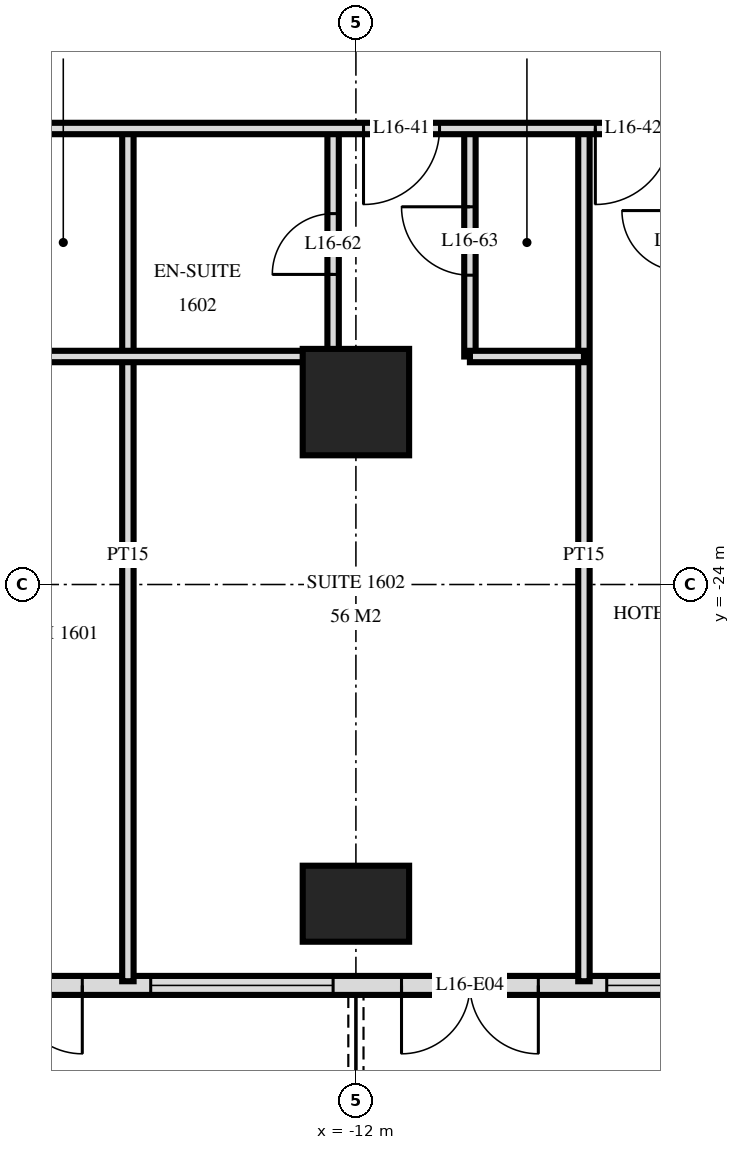
"""IFC4 building model, lengths in metres.
Left out: names, types, materials, properties, quantities, classifications, styles, units other than length and angle.
Written with IfcOpenShell. Run it as: python <this file> out.ifc"""

import sys

from ifc_helpers import new_model, si_unit, direction, frame, frame_2d, origin, origin_2d, place, context, subcontext, project, spatial, rectangle, extrude, element, fill, save


model = new_model("IFC4")
c1 = context("Model", 3, precision=1e-05, world=origin(), true_north=direction((0.0, 1.0)))
c2 = subcontext(c1, "Body", "Model", "MODEL_VIEW")
j1 = project(units=[si_unit("LENGTHUNIT", "METRE"), si_unit("PLANEANGLEUNIT", "RADIAN")], contexts=[c1])
p1 = place(None, origin())
s1 = spatial("IfcSite", under=j1, at=p1, CompositionType="ELEMENT")
p2 = place(p1, origin())
s2 = spatial("IfcBuilding", under=s1, at=p2, CompositionType="ELEMENT")
p3 = place(p2, frame((0.0, 0.0, 67.2)))
s3 = spatial("IfcBuildingStorey", under=s2, at=p3, CompositionType="ELEMENT", Elevation=67.2)
p4 = place(p3, frame((-12.0, -28.2, 0.0), z_axis=(0.0, 0.0, 1.0), x_axis=(1.0, 0.0, 0.0)))
e1 = element("IfcColumn", 1, at=p4, inside=s3, PredefinedType="COLUMN", context=c2, shape_type="SweptSolid", body=[
    extrude(rectangle(XDim=1.4, YDim=1.0, at=origin_2d()), origin(), (0.0, 0.0, 1.0), 3.6),
])
p5 = place(p3, frame((-12.0, -21.6, 0.0), z_axis=(0.0, 0.0, 1.0), x_axis=(1.0, 0.0, 0.0)))
e2 = element("IfcColumn", 2, at=p5, inside=s3, PredefinedType="COLUMN", context=c2, shape_type="SweptSolid", body=[
    extrude(rectangle(XDim=1.4, YDim=1.4, at=origin_2d()), origin(), (0.0, 0.0, 1.0), 3.6),
])
p6 = place(p3, frame((-28.775, -29.275, 0.0), z_axis=(0.0, 0.0, 1.0), x_axis=(1.0, 0.0, 0.0)))
e3 = element("IfcWall", 3, at=p6, inside=s3, PredefinedType="SOLIDWALL", context=c2, shape_type="SweptSolid", body=[
    extrude(rectangle(XDim=57.551, YDim=0.25, at=frame_2d((28.775, 0.0))), origin(), (0.0, 0.0, 1.0), 3.32),
])
p7 = place(p6, frame((0.575, 0.0, 0.0)))
e4 = element("IfcOpeningElement", 4, at=p7, cuts=e3, PredefinedType="OPENING", context=c2, shape_type="SweptSolid", body=[
    extrude(rectangle(XDim=1.8, YDim=2.4, at=frame_2d((0.9, 1.2))), frame((0.0, 0.135, 0.0), z_axis=(0.0, -1.0, 0.0), x_axis=(1.0, 0.0, 0.0)), (0.0, 0.0, 1.0), 0.27),
])
p8 = place(p6, frame((5.075, 0.0, 0.3)))
e5 = element("IfcOpeningElement", 5, at=p8, cuts=e3, PredefinedType="OPENING", context=c2, shape_type="SweptSolid", body=[
    extrude(rectangle(XDim=2.4, YDim=2.1, at=frame_2d((1.2, 1.05))), frame((0.0, 0.135, 0.0), z_axis=(0.0, -1.0, 0.0), x_axis=(1.0, 0.0, 0.0)), (0.0, 0.0, 1.0), 0.27),
])
p9 = place(p6, frame((8.375, 0.0, 0.0)))
e6 = element("IfcOpeningElement", 6, at=p9, cuts=e3, PredefinedType="OPENING", context=c2, shape_type="SweptSolid", body=[
    extrude(rectangle(XDim=1.8, YDim=2.4, at=frame_2d((0.9, 1.2))), frame((0.0, 0.135, 0.0), z_axis=(0.0, -1.0, 0.0), x_axis=(1.0, 0.0, 0.0)), (0.0, 0.0, 1.0), 0.27),
])
p10 = place(p6, frame((11.375, 0.0, 0.0)))
e7 = element("IfcOpeningElement", 7, at=p10, cuts=e3, PredefinedType="OPENING", context=c2, shape_type="SweptSolid", body=[
    extrude(rectangle(XDim=1.8, YDim=2.4, at=frame_2d((0.9, 1.2))), frame((0.0, 0.135, 0.0), z_axis=(0.0, -1.0, 0.0), x_axis=(1.0, 0.0, 0.0)), (0.0, 0.0, 1.0), 0.27),
])
p11 = place(p6, frame((14.075, 0.0, 0.3)))
e8 = element("IfcOpeningElement", 8, at=p11, cuts=e3, PredefinedType="OPENING", context=c2, shape_type="SweptSolid", body=[
    extrude(rectangle(XDim=2.4, YDim=2.1, at=frame_2d((1.2, 1.05))), frame((0.0, 0.135, 0.0), z_axis=(0.0, -1.0, 0.0), x_axis=(1.0, 0.0, 0.0)), (0.0, 0.0, 1.0), 0.27),
])
p12 = place(p6, frame((17.375, 0.0, 0.0)))
e9 = element("IfcOpeningElement", 9, at=p12, cuts=e3, PredefinedType="OPENING", context=c2, shape_type="SweptSolid", body=[
    extrude(rectangle(XDim=1.8, YDim=2.4, at=frame_2d((0.9, 1.2))), frame((0.0, 0.135, 0.0), z_axis=(0.0, -1.0, 0.0), x_axis=(1.0, 0.0, 0.0)), (0.0, 0.0, 1.0), 0.27),
])
p13 = place(p6, frame((20.075, 0.0, 0.3)))
e10 = element("IfcOpeningElement", 10, at=p13, cuts=e3, PredefinedType="OPENING", context=c2, shape_type="SweptSolid", body=[
    extrude(rectangle(XDim=2.4, YDim=2.1, at=frame_2d((1.2, 1.05))), frame((0.0, 0.135, 0.0), z_axis=(0.0, -1.0, 0.0), x_axis=(1.0, 0.0, 0.0)), (0.0, 0.0, 1.0), 0.27),
])
p14 = place(p6, frame((23.075, 0.0, 0.3)))
e11 = element("IfcOpeningElement", 11, at=p14, cuts=e3, PredefinedType="OPENING", context=c2, shape_type="SweptSolid", body=[
    extrude(rectangle(XDim=2.4, YDim=2.1, at=frame_2d((1.2, 1.05))), frame((0.0, 0.135, 0.0), z_axis=(0.0, -1.0, 0.0), x_axis=(1.0, 0.0, 0.0)), (0.0, 0.0, 1.0), 0.27),
])
p15 = place(p6, frame((26.375, 0.0, 0.0)))
e12 = element("IfcOpeningElement", 12, at=p15, cuts=e3, PredefinedType="OPENING", context=c2, shape_type="SweptSolid", body=[
    extrude(rectangle(XDim=1.8, YDim=2.4, at=frame_2d((0.9, 1.2))), frame((0.0, 0.135, 0.0), z_axis=(0.0, -1.0, 0.0), x_axis=(1.0, 0.0, 0.0)), (0.0, 0.0, 1.0), 0.27),
])
p16 = place(p6, frame((29.375, 0.0, 0.0)))
e13 = element("IfcOpeningElement", 13, at=p16, cuts=e3, PredefinedType="OPENING", context=c2, shape_type="SweptSolid", body=[
    extrude(rectangle(XDim=1.8, YDim=2.4, at=frame_2d((0.9, 1.2))), frame((0.0, 0.135, 0.0), z_axis=(0.0, -1.0, 0.0), x_axis=(1.0, 0.0, 0.0)), (0.0, 0.0, 1.0), 0.27),
])
p17 = place(p6, frame((32.075, 0.0, 0.3)))
e14 = element("IfcOpeningElement", 14, at=p17, cuts=e3, PredefinedType="OPENING", context=c2, shape_type="SweptSolid", body=[
    extrude(rectangle(XDim=2.4, YDim=2.1, at=frame_2d((1.2, 1.05))), frame((0.0, 0.135, 0.0), z_axis=(0.0, -1.0, 0.0), x_axis=(1.0, 0.0, 0.0)), (0.0, 0.0, 1.0), 0.27),
])
p18 = place(p6, frame((35.375, 0.0, 0.0)))
e15 = element("IfcOpeningElement", 15, at=p18, cuts=e3, PredefinedType="OPENING", context=c2, shape_type="SweptSolid", body=[
    extrude(rectangle(XDim=1.8, YDim=2.4, at=frame_2d((0.9, 1.2))), frame((0.0, 0.135, 0.0), z_axis=(0.0, -1.0, 0.0), x_axis=(1.0, 0.0, 0.0)), (0.0, 0.0, 1.0), 0.27),
])
p19 = place(p6, frame((38.075, 0.0, 0.3)))
e16 = element("IfcOpeningElement", 16, at=p19, cuts=e3, PredefinedType="OPENING", context=c2, shape_type="SweptSolid", body=[
    extrude(rectangle(XDim=2.4, YDim=2.1, at=frame_2d((1.2, 1.05))), frame((0.0, 0.135, 0.0), z_axis=(0.0, -1.0, 0.0), x_axis=(1.0, 0.0, 0.0)), (0.0, 0.0, 1.0), 0.27),
])
p20 = place(p6, frame((41.075, 0.0, 0.3)))
e17 = element("IfcOpeningElement", 17, at=p20, cuts=e3, PredefinedType="OPENING", context=c2, shape_type="SweptSolid", body=[
    extrude(rectangle(XDim=2.4, YDim=2.1, at=frame_2d((1.2, 1.05))), frame((0.0, 0.135, 0.0), z_axis=(0.0, -1.0, 0.0), x_axis=(1.0, 0.0, 0.0)), (0.0, 0.0, 1.0), 0.27),
])
p21 = place(p6, frame((44.375, 0.0, 0.0)))
e18 = element("IfcOpeningElement", 18, at=p21, cuts=e3, PredefinedType="OPENING", context=c2, shape_type="SweptSolid", body=[
    extrude(rectangle(XDim=1.8, YDim=2.4, at=frame_2d((0.9, 1.2))), frame((0.0, 0.135, 0.0), z_axis=(0.0, -1.0, 0.0), x_axis=(1.0, 0.0, 0.0)), (0.0, 0.0, 1.0), 0.27),
])
p22 = place(p6, frame((47.075, 0.0, 0.3)))
e19 = element("IfcOpeningElement", 19, at=p22, cuts=e3, PredefinedType="OPENING", context=c2, shape_type="SweptSolid", body=[
    extrude(rectangle(XDim=2.4, YDim=2.1, at=frame_2d((1.2, 1.05))), frame((0.0, 0.135, 0.0), z_axis=(0.0, -1.0, 0.0), x_axis=(1.0, 0.0, 0.0)), (0.0, 0.0, 1.0), 0.27),
])
p23 = place(p6, frame((50.375, 0.0, 0.0)))
e20 = element("IfcOpeningElement", 20, at=p23, cuts=e3, PredefinedType="OPENING", context=c2, shape_type="SweptSolid", body=[
    extrude(rectangle(XDim=1.8, YDim=2.4, at=frame_2d((0.9, 1.2))), frame((0.0, 0.135, 0.0), z_axis=(0.0, -1.0, 0.0), x_axis=(1.0, 0.0, 0.0)), (0.0, 0.0, 1.0), 0.27),
])
p24 = place(p6, frame((53.375, 0.0, 0.0)))
e21 = element("IfcOpeningElement", 21, at=p24, cuts=e3, PredefinedType="OPENING", context=c2, shape_type="SweptSolid", body=[
    extrude(rectangle(XDim=1.8, YDim=2.4, at=frame_2d((0.9, 1.2))), frame((0.0, 0.135, 0.0), z_axis=(0.0, -1.0, 0.0), x_axis=(1.0, 0.0, 0.0)), (0.0, 0.0, 1.0), 0.27),
])
p25 = place(p3, frame((-9.0, -29.22, 0.0), z_axis=(0.0, 0.0, 1.0), x_axis=(0.0, 1.0, 0.0)))
e22 = element("IfcWall", 22, at=p25, inside=s3, PredefinedType="PARTITIONING", context=c2, shape_type="SweptSolid", body=[
    extrude(rectangle(XDim=11.22, YDim=0.15, at=frame_2d((5.61, 0.0))), origin(), (0.0, 0.0, 1.0), 3.32),
])
p26 = place(p3, frame((-10.5, -21.0, 0.0), z_axis=(0.0, 0.0, 1.0), x_axis=(0.0, 1.0, 0.0)))
e23 = element("IfcWall", 23, at=p26, inside=s3, PredefinedType="PARTITIONING", context=c2, shape_type="SweptSolid", body=[
    extrude(rectangle(XDim=3.0, YDim=0.15, at=frame_2d((1.5, 0.0))), origin(), (0.0, 0.0, 1.0), 3.32),
])
p27 = place(p26, frame((1.07, 0.0, 0.0)))
e24 = element("IfcOpeningElement", 24, at=p27, cuts=e23, PredefinedType="OPENING", context=c2, shape_type="SweptSolid", body=[
    extrude(rectangle(XDim=0.9, YDim=2.1, at=frame_2d((0.45, 1.05))), frame((0.0, 0.085, 0.0), z_axis=(0.0, -1.0, 0.0), x_axis=(1.0, 0.0, 0.0)), (0.0, 0.0, 1.0), 0.17),
])
p28 = place(p3, frame((-12.3, -21.0, 0.0), z_axis=(0.0, 0.0, 1.0), x_axis=(0.0, 1.0, 0.0)))
e25 = element("IfcWall", 25, at=p28, inside=s3, PredefinedType="PARTITIONING", context=c2, shape_type="SweptSolid", body=[
    extrude(rectangle(XDim=3.0, YDim=0.15, at=frame_2d((1.5, 0.0))), origin(), (0.0, 0.0, 1.0), 3.32),
])
p29 = place(p28, frame((1.08, 0.0, 0.0)))
e26 = element("IfcOpeningElement", 26, at=p29, cuts=e25, PredefinedType="OPENING", context=c2, shape_type="SweptSolid", body=[
    extrude(rectangle(XDim=0.8, YDim=2.1, at=frame_2d((0.4, 1.05))), frame((0.0, 0.085, 0.0), z_axis=(0.0, -1.0, 0.0), x_axis=(1.0, 0.0, 0.0)), (0.0, 0.0, 1.0), 0.17),
])
p30 = place(p3, frame((-15.0, -29.22, 0.0), z_axis=(0.0, 0.0, 1.0), x_axis=(0.0, 1.0, 0.0)))
e27 = element("IfcWall", 27, at=p30, inside=s3, PredefinedType="PARTITIONING", context=c2, shape_type="SweptSolid", body=[
    extrude(rectangle(XDim=11.22, YDim=0.15, at=frame_2d((5.61, 0.0))), origin(), (0.0, 0.0, 1.0), 3.32),
])
p31 = place(p3, frame((-16.7, -21.0, 0.0), z_axis=(0.0, 0.0, 1.0), x_axis=(1.0, 0.0, 0.0)))
e28 = element("IfcWall", 28, at=p31, inside=s3, PredefinedType="PARTITIONING", context=c2, shape_type="SweptSolid", body=[
    extrude(rectangle(XDim=4.4, YDim=0.15, at=frame_2d((2.2, 0.0))), origin(), (0.0, 0.0, 1.0), 3.32),
])
p32 = place(p3, frame((-10.5, -21.0, 0.0), z_axis=(0.0, 0.0, 1.0), x_axis=(1.0, 0.0, 0.0)))
e29 = element("IfcWall", 29, at=p32, inside=s3, PredefinedType="PARTITIONING", context=c2, shape_type="SweptSolid", body=[
    extrude(rectangle(XDim=1.5, YDim=0.15, at=frame_2d((0.75, 0.0))), origin(), (0.0, 0.0, 1.0), 3.32),
])
p33 = place(p3, frame((-33.12, -18.0, 0.0), z_axis=(0.0, 0.0, 1.0), x_axis=(1.0, 0.0, 0.0)))
e30 = element("IfcWall", 30, at=p33, inside=s3, PredefinedType="PARTITIONING", context=c2, shape_type="SweptSolid", body=[
    extrude(rectangle(XDim=66.24, YDim=0.15, at=frame_2d((33.12, 0.0))), origin(), (0.0, 0.0, 1.0), 3.32),
])
p34 = place(p33, frame((15.27, 0.0, 0.0)))
e31 = element("IfcOpeningElement", 31, at=p34, cuts=e30, PredefinedType="OPENING", context=c2, shape_type="SweptSolid", body=[
    extrude(rectangle(XDim=1.0, YDim=2.1, at=frame_2d((0.5, 1.05))), frame((0.0, 0.085, 0.0), z_axis=(0.0, -1.0, 0.0), x_axis=(1.0, 0.0, 0.0)), (0.0, 0.0, 1.0), 0.17),
])
p35 = place(p33, frame((21.22, 0.0, 0.0)))
e32 = element("IfcOpeningElement", 32, at=p35, cuts=e30, PredefinedType="OPENING", context=c2, shape_type="SweptSolid", body=[
    extrude(rectangle(XDim=1.0, YDim=2.1, at=frame_2d((0.5, 1.05))), frame((0.0, 0.085, 0.0), z_axis=(0.0, -1.0, 0.0), x_axis=(1.0, 0.0, 0.0)), (0.0, 0.0, 1.0), 0.17),
])
p36 = place(p33, frame((24.27, 0.0, 0.0)))
e33 = element("IfcOpeningElement", 33, at=p36, cuts=e30, PredefinedType="OPENING", context=c2, shape_type="SweptSolid", body=[
    extrude(rectangle(XDim=1.0, YDim=2.1, at=frame_2d((0.5, 1.05))), frame((0.0, 0.085, 0.0), z_axis=(0.0, -1.0, 0.0), x_axis=(1.0, 0.0, 0.0)), (0.0, 0.0, 1.0), 0.17),
])
p37 = place(p33, frame((30.97, 0.0, 0.0)))
e34 = element("IfcOpeningElement", 34, at=p37, cuts=e30, PredefinedType="OPENING", context=c2, shape_type="SweptSolid", body=[
    extrude(rectangle(XDim=1.0, YDim=2.1, at=frame_2d((0.5, 1.05))), frame((0.0, 0.085, 0.0), z_axis=(0.0, -1.0, 0.0), x_axis=(1.0, 0.0, 0.0)), (0.0, 0.0, 1.0), 0.17),
])
p38 = place(p33, frame((40.42, 0.0, 0.0)))
e35 = element("IfcOpeningElement", 35, at=p38, cuts=e30, PredefinedType="OPENING", context=c2, shape_type="SweptSolid", body=[
    extrude(rectangle(XDim=1.0, YDim=2.1, at=frame_2d((0.5, 1.05))), frame((0.0, 0.085, 0.0), z_axis=(0.0, -1.0, 0.0), x_axis=(1.0, 0.0, 0.0)), (0.0, 0.0, 1.0), 0.17),
])
p39 = place(p33, frame((43.97, 0.0, 0.0)))
e36 = element("IfcOpeningElement", 36, at=p39, cuts=e30, PredefinedType="OPENING", context=c2, shape_type="SweptSolid", body=[
    extrude(rectangle(XDim=1.0, YDim=2.1, at=frame_2d((0.5, 1.05))), frame((0.0, 0.085, 0.0), z_axis=(0.0, -1.0, 0.0), x_axis=(1.0, 0.0, 0.0)), (0.0, 0.0, 1.0), 0.17),
])
p40 = place(p33, frame((45.52, 0.0, 0.0)))
e37 = element("IfcOpeningElement", 37, at=p40, cuts=e30, PredefinedType="OPENING", context=c2, shape_type="SweptSolid", body=[
    extrude(rectangle(XDim=1.0, YDim=2.1, at=frame_2d((0.5, 1.05))), frame((0.0, 0.085, 0.0), z_axis=(0.0, -1.0, 0.0), x_axis=(1.0, 0.0, 0.0)), (0.0, 0.0, 1.0), 0.17),
])
p41 = place(p33, frame((52.97, 0.0, 0.0)))
e38 = element("IfcOpeningElement", 38, at=p41, cuts=e30, PredefinedType="OPENING", context=c2, shape_type="SweptSolid", body=[
    extrude(rectangle(XDim=1.0, YDim=2.1, at=frame_2d((0.5, 1.05))), frame((0.0, 0.085, 0.0), z_axis=(0.0, -1.0, 0.0), x_axis=(1.0, 0.0, 0.0)), (0.0, 0.0, 1.0), 0.17),
])
p42 = place(p33, frame((54.27, 0.0, 0.0)))
e39 = element("IfcOpeningElement", 39, at=p42, cuts=e30, PredefinedType="OPENING", context=c2, shape_type="SweptSolid", body=[
    extrude(rectangle(XDim=1.0, YDim=2.1, at=frame_2d((0.5, 1.05))), frame((0.0, 0.085, 0.0), z_axis=(0.0, -1.0, 0.0), x_axis=(1.0, 0.0, 0.0)), (0.0, 0.0, 1.0), 0.17),
])
p43 = place(p33, frame((13.42, 0.0, 0.0)))
e40 = element("IfcOpeningElement", 40, at=p43, cuts=e30, PredefinedType="OPENING", context=c2, shape_type="SweptSolid", body=[
    extrude(rectangle(XDim=1.0, YDim=2.1, at=frame_2d((0.5, 1.05))), frame((0.0, 0.085, 0.0), z_axis=(0.0, -1.0, 0.0), x_axis=(1.0, 0.0, 0.0)), (0.0, 0.0, 1.0), 0.17),
])
p44 = place(p33, frame((60.82, 0.0, 0.0)))
e41 = element("IfcOpeningElement", 41, at=p44, cuts=e30, PredefinedType="OPENING", context=c2, shape_type="SweptSolid", body=[
    extrude(rectangle(XDim=1.0, YDim=2.1, at=frame_2d((0.5, 1.05))), frame((0.0, 0.085, 0.0), z_axis=(0.0, -1.0, 0.0), x_axis=(1.0, 0.0, 0.0)), (0.0, 0.0, 1.0), 0.17),
])
p45 = place(p10, frame((0.9, 0.0, 0.0), z_axis=(0.0, 0.0, 1.0), x_axis=(-1.0, 0.0, 0.0)))
e42 = element("IfcDoor", 42, at=p45, inside=s3, OperationType="DOUBLE_DOOR_SINGLE_SWING", PredefinedType="DOOR", context=c2, shape_type="SweptSolid", body=[
    extrude(rectangle(XDim=1.8, YDim=2.4, at=frame_2d((0.0, 1.2))), frame((0.0, -0.025, 0.0), z_axis=(0.0, 1.0, 0.0), x_axis=(-1.0, 0.0, 0.0)), (0.0, 0.0, 1.0), 0.05),
])
fill(e7, e42)
p46 = place(p11, origin())
e43 = element("IfcWindow", 43, at=p46, inside=s3, PartitioningType="SINGLE_PANEL", PredefinedType="WINDOW", context=c2, shape_type="SweptSolid", body=[
    extrude(rectangle(XDim=2.4, YDim=2.1, at=frame_2d((1.2, 1.05))), frame((0.0, 0.03, 0.0), z_axis=(0.0, -1.0, 0.0), x_axis=(1.0, 0.0, 0.0)), (0.0, 0.0, 1.0), 0.06),
])
fill(e8, e43)
p47 = place(p12, frame((0.9, 0.0, 0.0), z_axis=(0.0, 0.0, 1.0), x_axis=(-1.0, 0.0, 0.0)))
e44 = element("IfcDoor", 44, at=p47, inside=s3, OperationType="DOUBLE_DOOR_SINGLE_SWING", PredefinedType="DOOR", context=c2, shape_type="SweptSolid", body=[
    extrude(rectangle(XDim=1.8, YDim=2.4, at=frame_2d((0.0, 1.2))), frame((0.0, -0.025, 0.0), z_axis=(0.0, 1.0, 0.0), x_axis=(-1.0, 0.0, 0.0)), (0.0, 0.0, 1.0), 0.05),
])
fill(e9, e44)
p48 = place(p13, origin())
e45 = element("IfcWindow", 45, at=p48, inside=s3, PartitioningType="SINGLE_PANEL", PredefinedType="WINDOW", context=c2, shape_type="SweptSolid", body=[
    extrude(rectangle(XDim=2.4, YDim=2.1, at=frame_2d((1.2, 1.05))), frame((0.0, 0.03, 0.0), z_axis=(0.0, -1.0, 0.0), x_axis=(1.0, 0.0, 0.0)), (0.0, 0.0, 1.0), 0.06),
])
fill(e10, e45)
p49 = place(p35, frame((0.5, 0.0, 0.0), z_axis=(0.0, 0.0, 1.0), x_axis=(-1.0, 0.0, 0.0)))
e46 = element("IfcDoor", 46, at=p49, inside=s3, OperationType="SINGLE_SWING_LEFT", PredefinedType="DOOR", context=c2, shape_type="SweptSolid", body=[
    extrude(rectangle(XDim=1.0, YDim=2.1, at=frame_2d((0.0, 1.05))), frame((0.0, -0.025, 0.0), z_axis=(0.0, 1.0, 0.0), x_axis=(-1.0, 0.0, 0.0)), (0.0, 0.0, 1.0), 0.05),
])
fill(e32, e46)
p50 = place(p36, frame((0.5, 0.0, 0.0), z_axis=(0.0, 0.0, 1.0), x_axis=(-1.0, 0.0, 0.0)))
e47 = element("IfcDoor", 47, at=p50, inside=s3, OperationType="SINGLE_SWING_LEFT", PredefinedType="DOOR", context=c2, shape_type="SweptSolid", body=[
    extrude(rectangle(XDim=1.0, YDim=2.1, at=frame_2d((0.0, 1.05))), frame((0.0, -0.025, 0.0), z_axis=(0.0, 1.0, 0.0), x_axis=(-1.0, 0.0, 0.0)), (0.0, 0.0, 1.0), 0.05),
])
fill(e33, e47)
p51 = place(p29, origin())
e48 = element("IfcDoor", 48, at=p51, inside=s3, OperationType="SINGLE_SWING_RIGHT", PredefinedType="DOOR", context=c2, shape_type="SweptSolid", body=[
    extrude(rectangle(XDim=0.8, YDim=2.1, at=frame_2d((0.4, 1.05))), frame((0.0, 0.025, 0.0), z_axis=(0.0, -1.0, 0.0), x_axis=(1.0, 0.0, 0.0)), (0.0, 0.0, 1.0), 0.05),
])
fill(e26, e48)
p52 = place(p27, origin())
e49 = element("IfcDoor", 49, at=p52, inside=s3, OperationType="SINGLE_SWING_LEFT", PredefinedType="DOOR", context=c2, shape_type="SweptSolid", body=[
    extrude(rectangle(XDim=0.9, YDim=2.1, at=frame_2d((0.45, 1.05))), frame((0.0, 0.025, 0.0), z_axis=(0.0, -1.0, 0.0), x_axis=(1.0, 0.0, 0.0)), (0.0, 0.0, 1.0), 0.05),
])
fill(e24, e49)
save(model, sys.argv[1])
